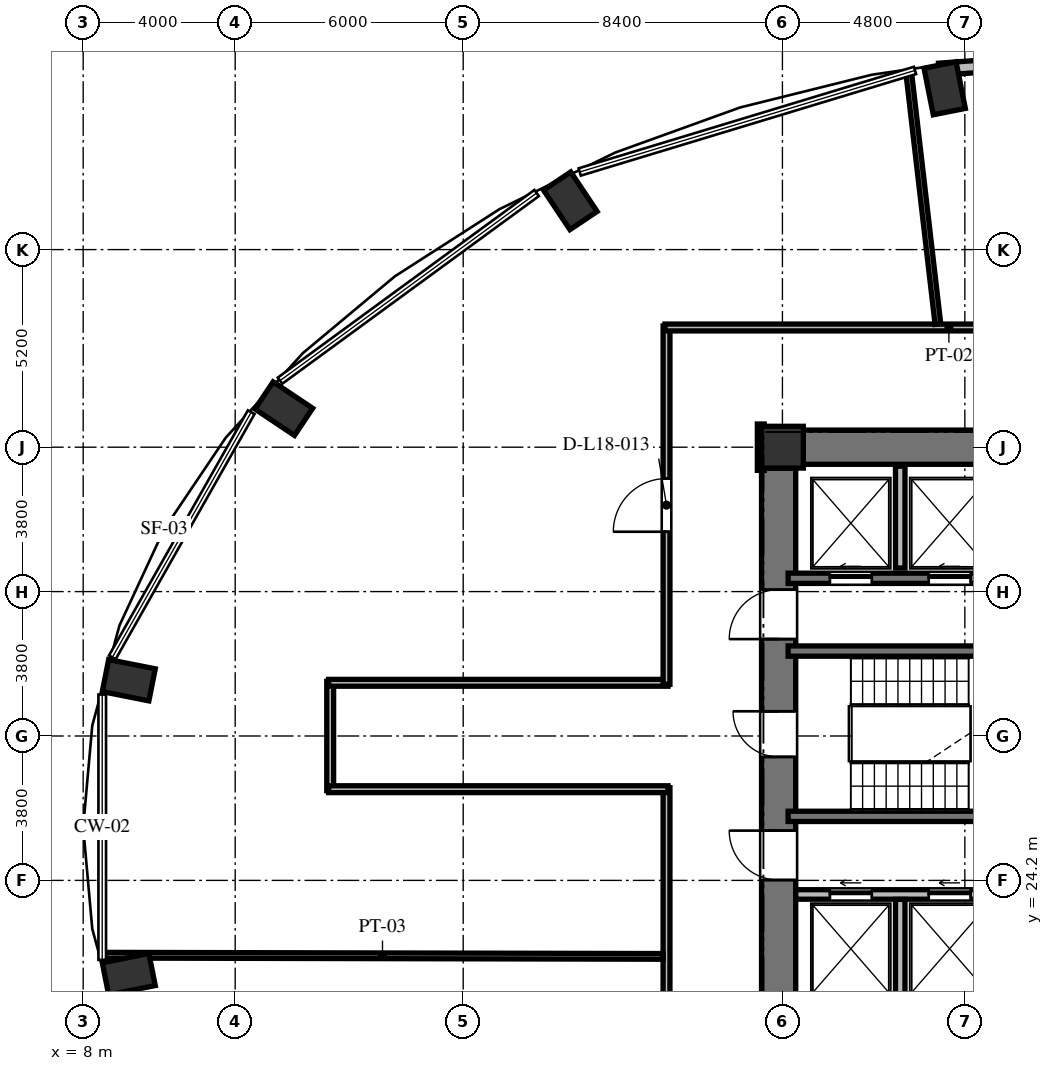
"""IFC4 building model, lengths in metres.
Left out: names, types, materials, properties, quantities, classifications, styles, units other than length and angle.
Written with IfcOpenShell. Run it as: python <this file> out.ifc"""

import sys

from ifc_helpers import new_model, si_unit, direction, frame, frame_2d, origin, origin_2d, place, context, subcontext, project, spatial, rectangle, extrude, element, fill, save


model = new_model("IFC4")
c1 = context("Model", 3, precision=1e-05, world=origin(), true_north=direction((0.0, 1.0)))
c2 = subcontext(c1, "Body", "Model", "MODEL_VIEW")
j1 = project(units=[si_unit("LENGTHUNIT", "METRE"), si_unit("PLANEANGLEUNIT", "RADIAN")], contexts=[c1])
p1 = place(None, origin())
s1 = spatial("IfcSite", under=j1, at=p1, CompositionType="ELEMENT")
p2 = place(p1, origin())
s2 = spatial("IfcBuilding", under=s1, at=p2, CompositionType="ELEMENT")
p3 = place(p2, frame((0.0, 0.0, 72.624)))
s3 = spatial("IfcBuildingStorey", under=s2, at=p3, CompositionType="ELEMENT", Elevation=72.624)
for number, where, z_axis, x_axis in (
    (1, (30.669, 45.044, 0.0), (0.0, 0.0, 1.0), (-0.195, 0.981, 0.0)),
    (2, (20.819, 42.084, 0.0), (0.0, 0.0, 1.0), (-0.556, 0.831, 0.0)),
    (3, (13.28, 36.614, 0.0), (0.0, 0.0, 1.0), (-0.831, 0.556, 0.0)),
    (4, (9.2, 29.468, 0.0), (0.0, 0.0, 1.0), (-0.981, 0.195, 0.0)),
    (5, (9.2, 21.732, 0.0), (0.0, 0.0, 1.0), (-0.981, -0.195, 0.0)),
):
    element("IfcColumn", number, at=place(p3, frame(where, z_axis=z_axis, x_axis=x_axis)), inside=s3, PredefinedType="COLUMN", context=c2, shape_type="SweptSolid", body=[
        extrude(rectangle(XDim=1.25, YDim=0.86, at=origin_2d()), origin(), (0.0, 0.0, 1.0), 3.648),
    ])
p4 = place(p3, frame((26.4, 35.6, 0.0), z_axis=(0.0, 0.0, 1.0), x_axis=(1.0, 0.0, 0.0)))
e6 = element("IfcColumn", 6, at=p4, inside=s3, PredefinedType="COLUMN", context=c2, shape_type="SweptSolid", body=[
    extrude(rectangle(XDim=1.1, YDim=1.1, at=origin_2d()), origin(), (0.0, 0.0, 1.0), 3.648),
])
p5 = place(p3, frame((26.3, 20.95, 0.0), z_axis=(0.0, 0.0, 1.0), x_axis=(0.0, 1.0, 0.0)))
e7 = element("IfcWall", 7, at=p5, inside=s3, PredefinedType="SHEAR", context=c2, shape_type="SweptSolid", body=[
    extrude(rectangle(XDim=14.1, YDim=0.9, at=frame_2d((7.05, 0.0))), origin(), (0.0, 0.0, 1.0), 3.648),
])
p6 = place(p5, frame((6.5, 0.0, 0.0)))
e8 = element("IfcOpeningElement", 8, at=p6, cuts=e7, PredefinedType="OPENING", context=c2, shape_type="SweptSolid", body=[
    extrude(rectangle(XDim=1.2, YDim=2.15, at=frame_2d((0.6, 1.075))), frame((0.0, 0.46, 0.0), z_axis=(0.0, -1.0, 0.0), x_axis=(1.0, 0.0, 0.0)), (0.0, 0.0, 1.0), 0.92),
])
p7 = place(p5, frame((9.6, 0.0, 0.0)))
e9 = element("IfcOpeningElement", 9, at=p7, cuts=e7, PredefinedType="OPENING", context=c2, shape_type="SweptSolid", body=[
    extrude(rectangle(XDim=1.3, YDim=2.2, at=frame_2d((0.65, 1.1))), frame((0.0, 0.46, 0.0), z_axis=(0.0, -1.0, 0.0), x_axis=(1.0, 0.0, 0.0)), (0.0, 0.0, 1.0), 0.92),
])
p8 = place(p5, frame((3.26, 0.0, 0.0)))
e10 = element("IfcOpeningElement", 10, at=p8, cuts=e7, PredefinedType="OPENING", context=c2, shape_type="SweptSolid", body=[
    extrude(rectangle(XDim=1.3, YDim=2.2, at=frame_2d((0.65, 1.1))), frame((0.0, 0.46, 0.0), z_axis=(0.0, -1.0, 0.0), x_axis=(1.0, 0.0, 0.0)), (0.0, 0.0, 1.0), 0.92),
])
p9 = place(p3, frame((26.95, 35.6, 0.0), z_axis=(0.0, 0.0, 1.0), x_axis=(1.0, 0.0, 0.0)))
e11 = element("IfcWall", 11, at=p9, inside=s3, PredefinedType="SHEAR", context=c2, shape_type="SweptSolid", body=[
    extrude(rectangle(XDim=5.3, YDim=0.9, at=frame_2d((2.65, 0.0))), origin(), (0.0, 0.0, 1.0), 3.648),
])
p10 = place(p3, frame((36.179, 45.953, 0.0), z_axis=(0.0, 0.0, 1.0), x_axis=(-0.997421878774, -0.071760683825, 0.0)))
e12 = element("IfcWall", 12, at=p10, inside=s3, PredefinedType="SOLIDWALL", context=c2, shape_type="SweptSolid", body=[
    extrude(rectangle(XDim=5.675, YDim=0.32, at=frame_2d((2.837, 0.0))), origin(), (0.0, 0.0, 1.0), 3.198),
])
p11 = place(p10, frame((2.237, 0.0, 0.85)))
e13 = element("IfcOpeningElement", 13, at=p11, cuts=e12, PredefinedType="OPENING", context=c2, shape_type="SweptSolid", body=[
    extrude(rectangle(XDim=1.2, YDim=1.8, at=frame_2d((0.6, 0.9))), frame((0.0, 0.17, 0.0), z_axis=(0.0, -1.0, 0.0), x_axis=(1.0, 0.0, 0.0)), (0.0, 0.0, 1.0), 0.34),
])
for number, where, z_axis, x_axis in (
    (14, (26.55, 30.235, 0.0), (0.0, 0.0, 1.0), (1.0, 0.0, 0.0)),
    (15, (26.55, 25.885, 0.0), (0.0, 0.0, 1.0), (1.0, 0.0, 0.0)),
):
    element("IfcWall", number, at=place(p3, frame(where, z_axis=z_axis, x_axis=x_axis)), inside=s3, PredefinedType="SHEAR", context=c2, shape_type="SweptSolid", body=[
        extrude(rectangle(XDim=7.985, YDim=0.27, at=frame_2d((3.992, 0.0))), origin(), (0.0, 0.0, 1.0), 3.648),
    ])
p12 = place(p3, frame((26.55, 32.15, 0.0), z_axis=(0.0, 0.0, 1.0), x_axis=(1.0, 0.0, 0.0)))
e16 = element("IfcWall", 16, at=p12, inside=s3, PredefinedType="SHEAR", context=c2, shape_type="SweptSolid", body=[
    extrude(rectangle(XDim=16.4, YDim=0.27, at=frame_2d((8.2, 0.0))), origin(), (0.0, 0.0, 1.0), 3.648),
])
p13 = place(p12, frame((1.1, 0.0, 0.0)))
e17 = element("IfcOpeningElement", 17, at=p13, cuts=e16, PredefinedType="OPENING", context=c2, shape_type="SweptSolid", body=[
    extrude(rectangle(XDim=1.1, YDim=2.2, at=frame_2d((0.55, 1.1))), frame((0.0, 0.145, 0.0), z_axis=(0.0, -1.0, 0.0), x_axis=(1.0, 0.0, 0.0)), (0.0, 0.0, 1.0), 0.29),
])
p14 = place(p12, frame((3.7, 0.0, 0.0)))
e18 = element("IfcOpeningElement", 18, at=p14, cuts=e16, PredefinedType="OPENING", context=c2, shape_type="SweptSolid", body=[
    extrude(rectangle(XDim=1.1, YDim=2.2, at=frame_2d((0.55, 1.1))), frame((0.0, 0.145, 0.0), z_axis=(0.0, -1.0, 0.0), x_axis=(1.0, 0.0, 0.0)), (0.0, 0.0, 1.0), 0.29),
])
p15 = place(p12, frame((6.5, 0.0, 0.0)))
e19 = element("IfcOpeningElement", 19, at=p15, cuts=e16, PredefinedType="OPENING", context=c2, shape_type="SweptSolid", body=[
    extrude(rectangle(XDim=1.1, YDim=2.2, at=frame_2d((0.55, 1.1))), frame((0.0, 0.145, 0.0), z_axis=(0.0, -1.0, 0.0), x_axis=(1.0, 0.0, 0.0)), (0.0, 0.0, 1.0), 0.29),
])
p16 = place(p12, frame((9.1, 0.0, 0.0)))
e20 = element("IfcOpeningElement", 20, at=p16, cuts=e16, PredefinedType="OPENING", context=c2, shape_type="SweptSolid", body=[
    extrude(rectangle(XDim=1.1, YDim=2.2, at=frame_2d((0.55, 1.1))), frame((0.0, 0.145, 0.0), z_axis=(0.0, -1.0, 0.0), x_axis=(1.0, 0.0, 0.0)), (0.0, 0.0, 1.0), 0.29),
])
p17 = place(p12, frame((11.9, 0.0, 0.0)))
e21 = element("IfcOpeningElement", 21, at=p17, cuts=e16, PredefinedType="OPENING", context=c2, shape_type="SweptSolid", body=[
    extrude(rectangle(XDim=1.1, YDim=2.2, at=frame_2d((0.55, 1.1))), frame((0.0, 0.145, 0.0), z_axis=(0.0, -1.0, 0.0), x_axis=(1.0, 0.0, 0.0)), (0.0, 0.0, 1.0), 0.29),
])
p18 = place(p12, frame((14.5, 0.0, 0.0)))
e22 = element("IfcOpeningElement", 22, at=p18, cuts=e16, PredefinedType="OPENING", context=c2, shape_type="SweptSolid", body=[
    extrude(rectangle(XDim=1.1, YDim=2.2, at=frame_2d((0.55, 1.1))), frame((0.0, 0.145, 0.0), z_axis=(0.0, -1.0, 0.0), x_axis=(1.0, 0.0, 0.0)), (0.0, 0.0, 1.0), 0.29),
])
p19 = place(p3, frame((26.75, 23.83, 0.0), z_axis=(0.0, 0.0, 1.0), x_axis=(1.0, 0.0, 0.0)))
e23 = element("IfcWall", 23, at=p19, inside=s3, PredefinedType="SOLIDWALL", context=c2, shape_type="SweptSolid", body=[
    extrude(rectangle(XDim=16.2, YDim=0.25, at=frame_2d((8.1, 0.0))), origin(), (0.0, 0.0, 1.0), 3.198),
])
p20 = place(p19, frame((0.9, 0.0, 0.0)))
e24 = element("IfcOpeningElement", 24, at=p20, cuts=e23, PredefinedType="OPENING", context=c2, shape_type="SweptSolid", body=[
    extrude(rectangle(XDim=1.1, YDim=2.2, at=frame_2d((0.55, 1.1))), frame((0.0, 0.135, 0.0), z_axis=(0.0, -1.0, 0.0), x_axis=(1.0, 0.0, 0.0)), (0.0, 0.0, 1.0), 0.27),
])
p21 = place(p19, frame((3.5, 0.0, 0.0)))
e25 = element("IfcOpeningElement", 25, at=p21, cuts=e23, PredefinedType="OPENING", context=c2, shape_type="SweptSolid", body=[
    extrude(rectangle(XDim=1.1, YDim=2.2, at=frame_2d((0.55, 1.1))), frame((0.0, 0.135, 0.0), z_axis=(0.0, -1.0, 0.0), x_axis=(1.0, 0.0, 0.0)), (0.0, 0.0, 1.0), 0.27),
])
p22 = place(p19, frame((6.3, 0.0, 0.0)))
e26 = element("IfcOpeningElement", 26, at=p22, cuts=e23, PredefinedType="OPENING", context=c2, shape_type="SweptSolid", body=[
    extrude(rectangle(XDim=1.1, YDim=2.2, at=frame_2d((0.55, 1.1))), frame((0.0, 0.135, 0.0), z_axis=(0.0, -1.0, 0.0), x_axis=(1.0, 0.0, 0.0)), (0.0, 0.0, 1.0), 0.27),
])
p23 = place(p19, frame((8.9, 0.0, 0.0)))
e27 = element("IfcOpeningElement", 27, at=p23, cuts=e23, PredefinedType="OPENING", context=c2, shape_type="SweptSolid", body=[
    extrude(rectangle(XDim=1.1, YDim=2.2, at=frame_2d((0.55, 1.1))), frame((0.0, 0.135, 0.0), z_axis=(0.0, -1.0, 0.0), x_axis=(1.0, 0.0, 0.0)), (0.0, 0.0, 1.0), 0.27),
])
p24 = place(p19, frame((11.7, 0.0, 0.0)))
e28 = element("IfcOpeningElement", 28, at=p24, cuts=e23, PredefinedType="OPENING", context=c2, shape_type="SweptSolid", body=[
    extrude(rectangle(XDim=1.1, YDim=2.2, at=frame_2d((0.55, 1.1))), frame((0.0, 0.135, 0.0), z_axis=(0.0, -1.0, 0.0), x_axis=(1.0, 0.0, 0.0)), (0.0, 0.0, 1.0), 0.27),
])
p25 = place(p19, frame((14.15, 0.0, 0.0)))
e29 = element("IfcOpeningElement", 29, at=p25, cuts=e23, PredefinedType="OPENING", context=c2, shape_type="SweptSolid", body=[
    extrude(rectangle(XDim=1.4, YDim=2.3, at=frame_2d((0.7, 1.15))), frame((0.0, 0.135, 0.0), z_axis=(0.0, -1.0, 0.0), x_axis=(1.0, 0.0, 0.0)), (0.0, 0.0, 1.0), 0.27),
])
p26 = place(p3, frame((29.5, 32.42, 0.0), z_axis=(0.0, 0.0, 1.0), x_axis=(0.0, 1.0, 0.0)))
e30 = element("IfcWall", 30, at=p26, inside=s3, PredefinedType="SOLIDWALL", context=c2, shape_type="SweptSolid", body=[
    extrude(rectangle(XDim=2.68, YDim=0.25, at=frame_2d((1.34, 0.0))), origin(), (0.0, 0.0, 1.0), 3.198),
])
p27 = place(p3, frame((29.5, 20.9, 0.0), z_axis=(0.0, 0.0, 1.0), x_axis=(0.0, 1.0, 0.0)))
e31 = element("IfcWall", 31, at=p27, inside=s3, PredefinedType="SOLIDWALL", context=c2, shape_type="SweptSolid", body=[
    extrude(rectangle(XDim=2.8, YDim=0.25, at=frame_2d((1.4, 0.0))), origin(), (0.0, 0.0, 1.0), 3.198),
])
p28 = place(p3, frame((14.5, 26.56, 0.0), z_axis=(0.0, 0.0, 1.0), x_axis=(0.0, 1.0, 0.0)))
e32 = element("IfcWall", 32, at=p28, inside=s3, PredefinedType="PARTITIONING", context=c2, shape_type="SweptSolid", body=[
    extrude(rectangle(XDim=2.88, YDim=0.18, at=frame_2d((1.44, 0.0))), origin(), (0.0, 0.0, 1.0), 3.198),
])
p29 = place(p3, frame((14.46, 29.4, 0.0), z_axis=(0.0, 0.0, 1.0), x_axis=(1.0, 0.0, 0.0)))
e33 = element("IfcWall", 33, at=p29, inside=s3, PredefinedType="PARTITIONING", context=c2, shape_type="SweptSolid", body=[
    extrude(rectangle(XDim=8.93, YDim=0.18, at=frame_2d((4.465, 0.0))), origin(), (0.0, 0.0, 1.0), 3.198),
])
p30 = place(p3, frame((23.35, 29.36, 0.0), z_axis=(0.0, 0.0, 1.0), x_axis=(0.0, 1.0, 0.0)))
e34 = element("IfcWall", 34, at=p30, inside=s3, PredefinedType="PARTITIONING", context=c2, shape_type="SweptSolid", body=[
    extrude(rectangle(XDim=9.43, YDim=0.18, at=frame_2d((4.715, 0.0))), origin(), (0.0, 0.0, 1.0), 3.198),
])
p31 = place(p30, frame((4.015, 0.0, 0.0)))
e35 = element("IfcOpeningElement", 35, at=p31, cuts=e34, PredefinedType="OPENING", context=c2, shape_type="SweptSolid", body=[
    extrude(rectangle(XDim=1.4, YDim=2.2, at=frame_2d((0.7, 1.1))), frame((0.0, 0.1, 0.0), z_axis=(0.0, -1.0, 0.0), x_axis=(1.0, 0.0, 0.0)), (0.0, 0.0, 1.0), 0.2),
])
p32 = place(p3, frame((23.31, 38.75, 0.0), z_axis=(0.0, 0.0, 1.0), x_axis=(1.0, 0.0, 0.0)))
e36 = element("IfcWall", 36, at=p32, inside=s3, PredefinedType="PARTITIONING", context=c2, shape_type="SweptSolid", body=[
    extrude(rectangle(XDim=29.88, YDim=0.18, at=frame_2d((14.94, 0.0))), origin(), (0.0, 0.0, 1.0), 2.823),
])
p33 = place(p32, frame((25.176, 0.0, 0.0)))
e37 = element("IfcOpeningElement", 37, at=p33, cuts=e36, PredefinedType="OPENING", context=c2, shape_type="SweptSolid", body=[
    extrude(rectangle(XDim=1.4, YDim=2.2, at=frame_2d((0.7, 1.1))), frame((0.0, 0.1, 0.0), z_axis=(0.0, -1.0, 0.0), x_axis=(1.0, 0.0, 0.0)), (0.0, 0.0, 1.0), 0.2),
])
p34 = place(p32, frame((17.74, 0.0, 0.0)))
e38 = element("IfcOpeningElement", 38, at=p34, cuts=e36, PredefinedType="OPENING", context=c2, shape_type="SweptSolid", body=[
    extrude(rectangle(XDim=1.4, YDim=2.2, at=frame_2d((0.7, 1.1))), frame((0.0, 0.1, 0.0), z_axis=(0.0, -1.0, 0.0), x_axis=(1.0, 0.0, 0.0)), (0.0, 0.0, 1.0), 0.2),
])
p35 = place(p32, frame((11.236, 0.0, 0.0)))
e39 = element("IfcOpeningElement", 39, at=p35, cuts=e36, PredefinedType="OPENING", context=c2, shape_type="SweptSolid", body=[
    extrude(rectangle(XDim=1.4, YDim=2.2, at=frame_2d((0.7, 1.1))), frame((0.0, 0.1, 0.0), z_axis=(0.0, -1.0, 0.0), x_axis=(1.0, 0.0, 0.0)), (0.0, 0.0, 1.0), 0.2),
])
p36 = place(p3, frame((25.83, 36.21, 0.0), z_axis=(0.0, 0.0, 1.0), x_axis=(0.0, -1.0, 0.0)))
e40 = element("IfcWall", 40, at=p36, inside=s3, PredefinedType="PARTITIONING", context=c2, shape_type="SweptSolid", body=[
    extrude(rectangle(XDim=1.22, YDim=0.18, at=frame_2d((0.61, 0.0))), origin(), (0.0, 0.0, 1.0), 3.198),
])
p37 = place(p3, frame((23.35, 17.36, 0.0), z_axis=(0.0, 0.0, 1.0), x_axis=(0.0, 1.0, 0.0)))
e41 = element("IfcWall", 41, at=p37, inside=s3, PredefinedType="PARTITIONING", context=c2, shape_type="SweptSolid", body=[
    extrude(rectangle(XDim=9.28, YDim=0.18, at=frame_2d((4.64, 0.0))), origin(), (0.0, 0.0, 1.0), 3.198),
])
p38 = place(p3, frame((23.39, 26.6, 0.0), z_axis=(0.0, 0.0, 1.0), x_axis=(-1.0, 0.0, 0.0)))
e42 = element("IfcWall", 42, at=p38, inside=s3, PredefinedType="PARTITIONING", context=c2, shape_type="SweptSolid", body=[
    extrude(rectangle(XDim=8.93, YDim=0.18, at=frame_2d((4.465, 0.0))), origin(), (0.0, 0.0, 1.0), 3.198),
])
p39 = place(p3, frame((8.493, 22.231, 0.0), z_axis=(0.0, 0.0, 1.0), x_axis=(0.999997760873, -0.002116187438, 0.0)))
e43 = element("IfcWall", 43, at=p39, inside=s3, PredefinedType="PARTITIONING", context=c2, shape_type="SweptSolid", body=[
    extrude(rectangle(XDim=14.767, YDim=0.15, at=frame_2d((7.384, 0.0))), origin(), (0.0, 0.0, 1.0), 3.198),
])
p40 = place(p3, frame((30.491, 38.84, 0.0), z_axis=(0.0, 0.0, 1.0), x_axis=(-0.115342161953, 0.993325820502, 0.0)))
e44 = element("IfcWall", 44, at=p40, inside=s3, PredefinedType="PARTITIONING", context=c2, shape_type="SweptSolid", body=[
    extrude(rectangle(XDim=6.672, YDim=0.15, at=frame_2d((3.336, 0.0))), origin(), (0.0, 0.0, 1.0), 3.198),
])
p41 = place(p6, origin())
e45 = element("IfcDoor", 45, at=p41, inside=s3, OperationType="SINGLE_SWING_RIGHT", PredefinedType="DOOR", context=c2, shape_type="SweptSolid", body=[
    extrude(rectangle(XDim=1.2, YDim=2.15, at=frame_2d((0.6, 1.075))), frame((0.0, 0.025, 0.0), z_axis=(0.0, -1.0, 0.0), x_axis=(1.0, 0.0, 0.0)), (0.0, 0.0, 1.0), 0.05),
])
fill(e8, e45)
p42 = place(p7, origin())
e46 = element("IfcDoor", 46, at=p42, inside=s3, OperationType="SINGLE_SWING_LEFT", PredefinedType="DOOR", context=c2, shape_type="SweptSolid", body=[
    extrude(rectangle(XDim=1.3, YDim=2.2, at=frame_2d((0.65, 1.1))), frame((0.0, 0.025, 0.0), z_axis=(0.0, -1.0, 0.0), x_axis=(1.0, 0.0, 0.0)), (0.0, 0.0, 1.0), 0.05),
])
fill(e9, e46)
p43 = place(p8, origin())
e47 = element("IfcDoor", 47, at=p43, inside=s3, OperationType="SINGLE_SWING_RIGHT", PredefinedType="DOOR", context=c2, shape_type="SweptSolid", body=[
    extrude(rectangle(XDim=1.3, YDim=2.2, at=frame_2d((0.65, 1.1))), frame((0.0, 0.025, 0.0), z_axis=(0.0, -1.0, 0.0), x_axis=(1.0, 0.0, 0.0)), (0.0, 0.0, 1.0), 0.05),
])
fill(e10, e47)
p44 = place(p13, origin())
e48 = element("IfcDoor", 48, at=p44, inside=s3, OperationType="SLIDING_TO_LEFT", PredefinedType="DOOR", context=c2, shape_type="SweptSolid", body=[
    extrude(rectangle(XDim=1.1, YDim=2.2, at=frame_2d((0.55, 1.1))), frame((0.0, 0.025, 0.0), z_axis=(0.0, -1.0, 0.0), x_axis=(1.0, 0.0, 0.0)), (0.0, 0.0, 1.0), 0.05),
])
fill(e17, e48)
p45 = place(p14, origin())
e49 = element("IfcDoor", 49, at=p45, inside=s3, OperationType="SLIDING_TO_LEFT", PredefinedType="DOOR", context=c2, shape_type="SweptSolid", body=[
    extrude(rectangle(XDim=1.1, YDim=2.2, at=frame_2d((0.55, 1.1))), frame((0.0, 0.025, 0.0), z_axis=(0.0, -1.0, 0.0), x_axis=(1.0, 0.0, 0.0)), (0.0, 0.0, 1.0), 0.05),
])
fill(e18, e49)
p46 = place(p20, origin())
e50 = element("IfcDoor", 50, at=p46, inside=s3, OperationType="SLIDING_TO_LEFT", PredefinedType="DOOR", context=c2, shape_type="SweptSolid", body=[
    extrude(rectangle(XDim=1.1, YDim=2.2, at=frame_2d((0.55, 1.1))), frame((0.0, 0.025, 0.0), z_axis=(0.0, -1.0, 0.0), x_axis=(1.0, 0.0, 0.0)), (0.0, 0.0, 1.0), 0.05),
])
fill(e24, e50)
p47 = place(p21, origin())
e51 = element("IfcDoor", 51, at=p47, inside=s3, OperationType="SLIDING_TO_LEFT", PredefinedType="DOOR", context=c2, shape_type="SweptSolid", body=[
    extrude(rectangle(XDim=1.1, YDim=2.2, at=frame_2d((0.55, 1.1))), frame((0.0, 0.025, 0.0), z_axis=(0.0, -1.0, 0.0), x_axis=(1.0, 0.0, 0.0)), (0.0, 0.0, 1.0), 0.05),
])
fill(e25, e51)
p48 = place(p31, origin())
e52 = element("IfcDoor", 52, at=p48, inside=s3, OperationType="SINGLE_SWING_LEFT", PredefinedType="DOOR", context=c2, shape_type="SweptSolid", body=[
    extrude(rectangle(XDim=1.4, YDim=2.2, at=frame_2d((0.7, 1.1))), frame((0.0, 0.025, 0.0), z_axis=(0.0, -1.0, 0.0), x_axis=(1.0, 0.0, 0.0)), (0.0, 0.0, 1.0), 0.05),
])
fill(e35, e52)
save(model, sys.argv[1])
